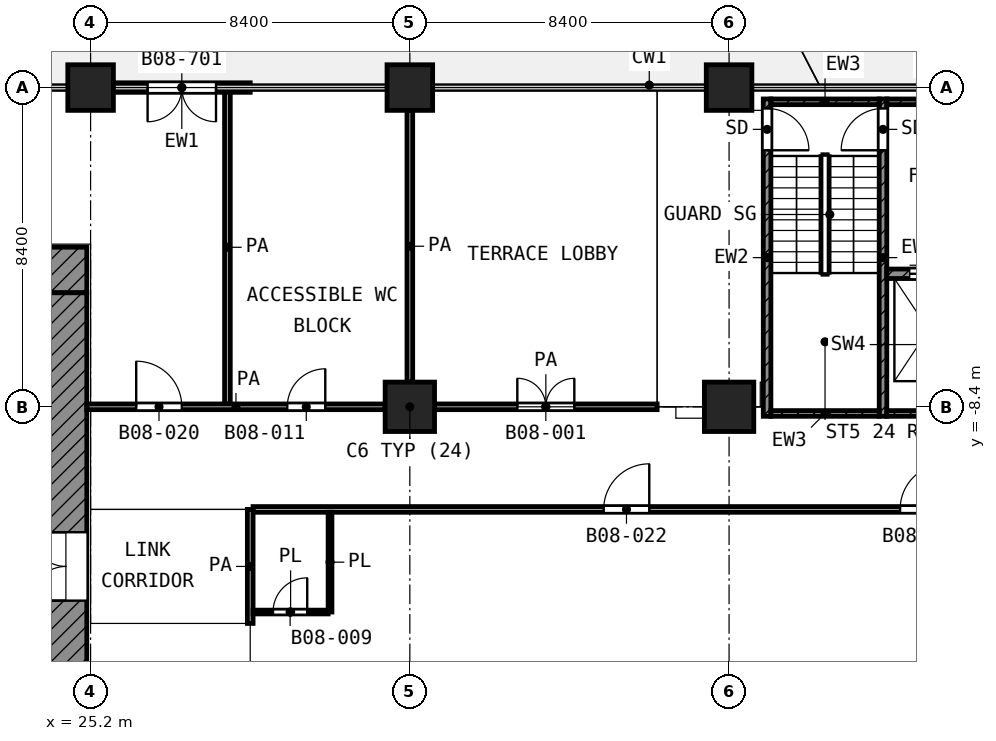
"""IFC4 building model, lengths in metres.
Left out: names, types, materials, properties, quantities, classifications, styles, units other than length and angle.
Written with IfcOpenShell. Run it as: python <this file> out.ifc"""

import sys

from ifc_helpers import new_model, si_unit, direction, frame, frame_2d, origin, origin_2d, place, context, subcontext, project, spatial, rectangle, extrude, element, fill, save


model = new_model("IFC4")
c1 = context("Model", 3, precision=1e-05, world=origin(), true_north=direction((0.0, 1.0)))
c2 = subcontext(c1, "Body", "Model", "MODEL_VIEW")
j1 = project(units=[si_unit("LENGTHUNIT", "METRE"), si_unit("PLANEANGLEUNIT", "RADIAN")], contexts=[c1])
p1 = place(None, origin())
s1 = spatial("IfcSite", under=j1, at=p1, CompositionType="ELEMENT")
p2 = place(p1, origin())
s2 = spatial("IfcBuilding", under=s1, at=p2, CompositionType="ELEMENT")
p3 = place(p2, frame((0.0, 0.0, 39.2)))
s3 = spatial("IfcBuildingStorey", under=s2, at=p3, CompositionType="ELEMENT", Elevation=39.2)
for number, where, z_axis, x_axis in (
    (1, (25.2, 0.0, 0.0), (0.0, 0.0, 1.0), (1.0, 0.0, 0.0)),
    (2, (33.6, 0.0, 0.0), (0.0, 0.0, 1.0), (1.0, 0.0, 0.0)),
    (3, (42.0, 0.0, 0.0), (0.0, 0.0, 1.0), (1.0, 0.0, 0.0)),
):
    element("IfcColumn", number, at=place(p3, frame(where, z_axis=z_axis, x_axis=x_axis)), inside=s3, PredefinedType="COLUMN", context=c2, shape_type="SweptSolid", body=[
        extrude(rectangle(XDim=1.2, YDim=1.2, at=origin_2d()), origin(), (0.0, 0.0, 1.0), 4.2),
    ])
for number, where, z_axis, x_axis in (
    (4, (33.6, -8.4, 0.0), (0.0, 0.0, 1.0), (1.0, 0.0, 0.0)),
    (5, (42.0, -8.4, 0.0), (0.0, 0.0, 1.0), (1.0, 0.0, 0.0)),
):
    element("IfcColumn", number, at=place(p3, frame(where, z_axis=z_axis, x_axis=x_axis)), inside=s3, PredefinedType="COLUMN", context=c2, shape_type="SweptSolid", body=[
        extrude(rectangle(XDim=1.3, YDim=1.3, at=origin_2d()), origin(), (0.0, 0.0, 1.0), 4.2),
    ])
p4 = place(p3, frame((29.4, 0.0, 0.0), z_axis=(0.0, 0.0, 1.0), x_axis=(-1.0, 0.0, 0.0)))
e6 = element("IfcWall", 6, at=p4, inside=s3, PredefinedType="SOLIDWALL", context=c2, shape_type="SweptSolid", body=[
    extrude(rectangle(XDim=3.6, YDim=0.25, at=frame_2d((1.8, 0.0))), origin(), (0.0, 0.0, 1.0), 3.78),
])
p5 = place(p4, frame((0.9, 0.0, 0.0)))
e7 = element("IfcOpeningElement", 7, at=p5, cuts=e6, PredefinedType="OPENING", context=c2, shape_type="SweptSolid", body=[
    extrude(rectangle(XDim=1.8, YDim=2.1, at=frame_2d((0.9, 1.05))), frame((0.0, 0.135, 0.0), z_axis=(0.0, -1.0, 0.0), x_axis=(1.0, 0.0, 0.0)), (0.0, 0.0, 1.0), 0.27),
])
p6 = place(p3, frame((4.2, -4.8, 0.0), z_axis=(0.0, 0.0, 1.0), x_axis=(1.0, 0.0, 0.0)))
e8 = element("IfcWall", 8, at=p6, inside=s3, PredefinedType="SHEAR", context=c2, shape_type="SweptSolid", body=[
    extrude(rectangle(XDim=20.9, YDim=1.2, at=frame_2d((10.45, 0.0))), origin(), (0.0, 0.0, 1.0), 3.9),
])
p7 = place(p6, frame((1.95, 0.0, 0.0)))
e9 = element("IfcOpeningElement", 9, at=p7, cuts=e8, PredefinedType="OPENING", context=c2, shape_type="SweptSolid", body=[
    extrude(rectangle(XDim=1.1, YDim=2.1, at=frame_2d((0.55, 1.05))), frame((0.0, 0.61, 0.0), z_axis=(0.0, -1.0, 0.0), x_axis=(1.0, 0.0, 0.0)), (0.0, 0.0, 1.0), 1.22),
])
p8 = place(p6, frame((17.95, 0.0, 0.0)))
e10 = element("IfcOpeningElement", 10, at=p8, cuts=e8, PredefinedType="OPENING", context=c2, shape_type="SweptSolid", body=[
    extrude(rectangle(XDim=1.1, YDim=2.1, at=frame_2d((0.55, 1.05))), frame((0.0, 0.61, 0.0), z_axis=(0.0, -1.0, 0.0), x_axis=(1.0, 0.0, 0.0)), (0.0, 0.0, 1.0), 1.22),
])
p9 = place(p3, frame((24.55, -24.0, 0.0), z_axis=(0.0, 0.0, 1.0), x_axis=(0.0, 1.0, 0.0)))
e11 = element("IfcWall", 11, at=p9, inside=s3, PredefinedType="SHEAR", context=c2, shape_type="SweptSolid", body=[
    extrude(rectangle(XDim=18.6, YDim=1.1, at=frame_2d((9.3, 0.0))), origin(), (0.0, 0.0, 1.0), 3.9),
])
p10 = place(p9, frame((10.5, 0.0, 0.0)))
e12 = element("IfcOpeningElement", 12, at=p10, cuts=e11, PredefinedType="OPENING", context=c2, shape_type="SweptSolid", body=[
    extrude(rectangle(XDim=1.8, YDim=2.1, at=frame_2d((0.9, 1.05))), frame((0.0, 0.56, 0.0), z_axis=(0.0, -1.0, 0.0), x_axis=(1.0, 0.0, 0.0)), (0.0, 0.0, 1.0), 1.12),
])
p11 = place(p3, frame((43.0, -8.65, 0.0), z_axis=(0.0, 0.0, 1.0), x_axis=(0.0, 1.0, 0.0)))
e13 = element("IfcWall", 13, at=p11, inside=s3, PredefinedType="SHEAR", context=c2, shape_type="SweptSolid", body=[
    extrude(rectangle(XDim=8.35, YDim=0.2, at=frame_2d((4.175, 0.0))), origin(), (0.0, 0.0, 1.0), 3.9),
])
p12 = place(p11, frame((7.0, 0.0, 0.0)))
e14 = element("IfcOpeningElement", 14, at=p12, cuts=e13, PredefinedType="OPENING", context=c2, shape_type="SweptSolid", body=[
    extrude(rectangle(XDim=1.1, YDim=2.1, at=frame_2d((0.55, 1.05))), frame((0.0, 0.11, 0.0), z_axis=(0.0, -1.0, 0.0), x_axis=(1.0, 0.0, 0.0)), (0.0, 0.0, 1.0), 0.22),
])
p13 = place(p3, frame((46.05, -8.65, 0.0), z_axis=(0.0, 0.0, 1.0), x_axis=(0.0, 1.0, 0.0)))
e15 = element("IfcWall", 15, at=p13, inside=s3, PredefinedType="SHEAR", context=c2, shape_type="SweptSolid", body=[
    extrude(rectangle(XDim=8.35, YDim=0.2, at=frame_2d((4.175, 0.0))), origin(), (0.0, 0.0, 1.0), 3.9),
])
p14 = place(p13, frame((7.0, 0.0, 0.0)))
e16 = element("IfcOpeningElement", 16, at=p14, cuts=e15, PredefinedType="OPENING", context=c2, shape_type="SweptSolid", body=[
    extrude(rectangle(XDim=1.1, YDim=2.1, at=frame_2d((0.55, 1.05))), frame((0.0, 0.11, 0.0), z_axis=(0.0, -1.0, 0.0), x_axis=(1.0, 0.0, 0.0)), (0.0, 0.0, 1.0), 0.22),
])
p15 = place(p3, frame((43.1, -0.375, 0.0), z_axis=(0.0, 0.0, 1.0), x_axis=(1.0, 0.0, 0.0)))
e17 = element("IfcWall", 17, at=p15, inside=s3, PredefinedType="SHEAR", context=c2, shape_type="SweptSolid", body=[
    extrude(rectangle(XDim=2.85, YDim=0.15, at=frame_2d((1.425, 0.0))), origin(), (0.0, 0.0, 1.0), 3.9),
])
p16 = place(p3, frame((46.15, -0.375, 0.0), z_axis=(0.0, 0.0, 1.0), x_axis=(1.0, 0.0, 0.0)))
e18 = element("IfcWall", 18, at=p16, inside=s3, PredefinedType="SHEAR", context=c2, shape_type="SweptSolid", body=[
    extrude(rectangle(XDim=2.45, YDim=0.15, at=frame_2d((1.225, 0.0))), origin(), (0.0, 0.0, 1.0), 3.9),
])
p17 = place(p3, frame((43.1, -8.575, 0.0), z_axis=(0.0, 0.0, 1.0), x_axis=(1.0, 0.0, 0.0)))
e19 = element("IfcWall", 19, at=p17, inside=s3, PredefinedType="SHEAR", context=c2, shape_type="SweptSolid", body=[
    extrude(rectangle(XDim=2.85, YDim=0.15, at=frame_2d((1.425, 0.0))), origin(), (0.0, 0.0, 1.0), 3.9),
])
p18 = place(p3, frame((46.15, -8.575, 0.0), z_axis=(0.0, 0.0, 1.0), x_axis=(1.0, 0.0, 0.0)))
e20 = element("IfcWall", 20, at=p18, inside=s3, PredefinedType="SHEAR", context=c2, shape_type="SweptSolid", body=[
    extrude(rectangle(XDim=2.45, YDim=0.15, at=frame_2d((1.225, 0.0))), origin(), (0.0, 0.0, 1.0), 3.9),
])
p19 = place(p3, frame((46.15, -4.9, 0.0), z_axis=(0.0, 0.0, 1.0), x_axis=(1.0, 0.0, 0.0)))
e21 = element("IfcWall", 21, at=p19, inside=s3, PredefinedType="SHEAR", context=c2, shape_type="SweptSolid", body=[
    extrude(rectangle(XDim=2.45, YDim=0.25, at=frame_2d((1.225, 0.0))), origin(), (0.0, 0.0, 1.0), 3.9),
])
p20 = place(p19, frame((0.6, 0.0, 0.0)))
e22 = element("IfcOpeningElement", 22, at=p20, cuts=e21, PredefinedType="OPENING", context=c2, shape_type="SweptSolid", body=[
    extrude(rectangle(XDim=1.3, YDim=2.1, at=frame_2d((0.65, 1.05))), frame((0.0, 0.135, 0.0), z_axis=(0.0, -1.0, 0.0), x_axis=(1.0, 0.0, 0.0)), (0.0, 0.0, 1.0), 0.27),
])
p21 = place(p3, frame((29.475, -13.8, 0.0), z_axis=(0.0, 0.0, 1.0), x_axis=(1.0, 0.0, 0.0)))
e23 = element("IfcWall", 23, at=p21, inside=s3, PredefinedType="PARTITIONING", context=c2, shape_type="SweptSolid", body=[
    extrude(rectangle(XDim=1.975, YDim=0.1, at=frame_2d((0.987, 0.0))), origin(), (0.0, 0.0, 1.0), 3.9),
])
p22 = place(p21, frame((0.525, 0.0, 0.0)))
e24 = element("IfcOpeningElement", 24, at=p22, cuts=e23, PredefinedType="OPENING", context=c2, shape_type="SweptSolid", body=[
    extrude(rectangle(XDim=0.9, YDim=2.1, at=frame_2d((0.45, 1.05))), frame((0.0, 0.06, 0.0), z_axis=(0.0, -1.0, 0.0), x_axis=(1.0, 0.0, 0.0)), (0.0, 0.0, 1.0), 0.12),
])
p23 = place(p3, frame((31.5, -13.8, 0.0), z_axis=(0.0, 0.0, 1.0), x_axis=(0.0, 1.0, 0.0)))
e25 = element("IfcWall", 25, at=p23, inside=s3, PredefinedType="PARTITIONING", context=c2, shape_type="SweptSolid", body=[
    extrude(rectangle(XDim=2.625, YDim=0.1, at=frame_2d((1.312, 0.0))), origin(), (0.0, 0.0, 1.0), 3.9),
])
p24 = place(p3, frame((29.475, -11.1, 0.0), z_axis=(0.0, 0.0, 1.0), x_axis=(1.0, 0.0, 0.0)))
e26 = element("IfcWall", 26, at=p24, inside=s3, PredefinedType="PARTITIONING", context=c2, shape_type="SweptSolid", body=[
    extrude(rectangle(XDim=50.245, YDim=0.15, at=frame_2d((25.123, 0.0))), origin(), (0.0, 0.0, 1.0), 3.9),
])
p25 = place(p24, frame((17.025, 0.0, 0.0)))
e27 = element("IfcOpeningElement", 27, at=p25, cuts=e26, PredefinedType="OPENING", context=c2, shape_type="SweptSolid", body=[
    extrude(rectangle(XDim=1.2, YDim=2.1, at=frame_2d((0.6, 1.05))), frame((0.0, 0.085, 0.0), z_axis=(0.0, -1.0, 0.0), x_axis=(1.0, 0.0, 0.0)), (0.0, 0.0, 1.0), 0.17),
])
p26 = place(p24, frame((9.225, 0.0, 0.0)))
e28 = element("IfcOpeningElement", 28, at=p26, cuts=e26, PredefinedType="OPENING", context=c2, shape_type="SweptSolid", body=[
    extrude(rectangle(XDim=1.2, YDim=2.1, at=frame_2d((0.6, 1.05))), frame((0.0, 0.085, 0.0), z_axis=(0.0, -1.0, 0.0), x_axis=(1.0, 0.0, 0.0)), (0.0, 0.0, 1.0), 0.17),
])
p27 = place(p24, frame((28.425, 0.0, 0.0)))
e29 = element("IfcOpeningElement", 29, at=p27, cuts=e26, PredefinedType="OPENING", context=c2, shape_type="SweptSolid", body=[
    extrude(rectangle(XDim=1.5, YDim=2.1, at=frame_2d((0.75, 1.05))), frame((0.0, 0.085, 0.0), z_axis=(0.0, -1.0, 0.0), x_axis=(1.0, 0.0, 0.0)), (0.0, 0.0, 1.0), 0.17),
])
p28 = place(p24, frame((36.675, 0.0, 0.0)))
e30 = element("IfcOpeningElement", 30, at=p28, cuts=e26, PredefinedType="OPENING", context=c2, shape_type="SweptSolid", body=[
    extrude(rectangle(XDim=1.5, YDim=2.1, at=frame_2d((0.75, 1.05))), frame((0.0, 0.085, 0.0), z_axis=(0.0, -1.0, 0.0), x_axis=(1.0, 0.0, 0.0)), (0.0, 0.0, 1.0), 0.17),
])
p29 = place(p24, frame((45.375, 0.0, 0.0)))
e31 = element("IfcOpeningElement", 31, at=p29, cuts=e26, PredefinedType="OPENING", context=c2, shape_type="SweptSolid", body=[
    extrude(rectangle(XDim=1.5, YDim=2.1, at=frame_2d((0.75, 1.05))), frame((0.0, 0.085, 0.0), z_axis=(0.0, -1.0, 0.0), x_axis=(1.0, 0.0, 0.0)), (0.0, 0.0, 1.0), 0.17),
])
p30 = place(p3, frame((25.1, -8.4, 0.0), z_axis=(0.0, 0.0, 1.0), x_axis=(1.0, 0.0, 0.0)))
e32 = element("IfcWall", 32, at=p30, inside=s3, PredefinedType="PARTITIONING", context=c2, shape_type="SweptSolid", body=[
    extrude(rectangle(XDim=7.85, YDim=0.15, at=frame_2d((3.925, 0.0))), origin(), (0.0, 0.0, 1.0), 3.9),
])
p31 = place(p30, frame((1.3, 0.0, 0.0)))
e33 = element("IfcOpeningElement", 33, at=p31, cuts=e32, PredefinedType="OPENING", context=c2, shape_type="SweptSolid", body=[
    extrude(rectangle(XDim=1.2, YDim=2.1, at=frame_2d((0.6, 1.05))), frame((0.0, 0.085, 0.0), z_axis=(0.0, -1.0, 0.0), x_axis=(1.0, 0.0, 0.0)), (0.0, 0.0, 1.0), 0.17),
])
p32 = place(p30, frame((5.275, 0.0, 0.0)))
e34 = element("IfcOpeningElement", 34, at=p32, cuts=e32, PredefinedType="OPENING", context=c2, shape_type="SweptSolid", body=[
    extrude(rectangle(XDim=1.0, YDim=2.1, at=frame_2d((0.5, 1.05))), frame((0.0, 0.085, 0.0), z_axis=(0.0, -1.0, 0.0), x_axis=(1.0, 0.0, 0.0)), (0.0, 0.0, 1.0), 0.17),
])
p33 = place(p3, frame((34.25, -8.4, 0.0), z_axis=(0.0, 0.0, 1.0), x_axis=(1.0, 0.0, 0.0)))
e35 = element("IfcWall", 35, at=p33, inside=s3, PredefinedType="PARTITIONING", context=c2, shape_type="SweptSolid", body=[
    extrude(rectangle(XDim=5.857, YDim=0.15, at=frame_2d((2.928, 0.0))), origin(), (0.0, 0.0, 1.0), 3.9),
])
p34 = place(p33, frame((2.178, 0.0, 0.0)))
e36 = element("IfcOpeningElement", 36, at=p34, cuts=e35, PredefinedType="OPENING", context=c2, shape_type="SweptSolid", body=[
    extrude(rectangle(XDim=1.5, YDim=2.1, at=frame_2d((0.75, 1.05))), frame((0.0, 0.085, 0.0), z_axis=(0.0, -1.0, 0.0), x_axis=(1.0, 0.0, 0.0)), (0.0, 0.0, 1.0), 0.17),
])
p35 = place(p3, frame((28.8, -8.325, 0.0), z_axis=(0.0, 0.0, 1.0), x_axis=(0.0, 1.0, 0.0)))
e37 = element("IfcWall", 37, at=p35, inside=s3, PredefinedType="PARTITIONING", context=c2, shape_type="SweptSolid", body=[
    extrude(rectangle(XDim=8.245, YDim=0.15, at=frame_2d((4.123, 0.0))), origin(), (0.0, 0.0, 1.0), 3.9),
])
p36 = place(p3, frame((29.4, -14.1, 0.0), z_axis=(0.0, 0.0, 1.0), x_axis=(0.0, 1.0, 0.0)))
e38 = element("IfcWall", 38, at=p36, inside=s3, PredefinedType="PARTITIONING", context=c2, shape_type="SweptSolid", body=[
    extrude(rectangle(XDim=3.0, YDim=0.15, at=frame_2d((1.5, 0.0))), origin(), (0.0, 0.0, 1.0), 3.9),
])
p37 = place(p3, frame((33.6, -7.75, 0.0), z_axis=(0.0, 0.0, 1.0), x_axis=(0.0, 1.0, 0.0)))
e39 = element("IfcWall", 39, at=p37, inside=s3, PredefinedType="PARTITIONING", context=c2, shape_type="SweptSolid", body=[
    extrude(rectangle(XDim=7.15, YDim=0.15, at=frame_2d((3.575, 0.0))), origin(), (0.0, 0.0, 1.0), 3.9),
])
p38 = place(p5, origin())
e40 = element("IfcDoor", 40, at=p38, inside=s3, OperationType="DOUBLE_DOOR_SINGLE_SWING", PredefinedType="DOOR", context=c2, shape_type="SweptSolid", body=[
    extrude(rectangle(XDim=1.8, YDim=2.1, at=frame_2d((0.9, 1.05))), frame((0.0, 0.025, 0.0), z_axis=(0.0, -1.0, 0.0), x_axis=(1.0, 0.0, 0.0)), (0.0, 0.0, 1.0), 0.05),
])
fill(e7, e40)
p39 = place(p10, origin())
e41 = element("IfcDoor", 41, at=p39, inside=s3, OperationType="DOUBLE_DOOR_SINGLE_SWING", PredefinedType="DOOR", context=c2, shape_type="SweptSolid", body=[
    extrude(rectangle(XDim=1.8, YDim=2.1, at=frame_2d((0.9, 1.05))), frame((0.0, 0.025, 0.0), z_axis=(0.0, -1.0, 0.0), x_axis=(1.0, 0.0, 0.0)), (0.0, 0.0, 1.0), 0.05),
])
fill(e12, e41)
p40 = place(p12, frame((1.1, 0.0, 0.0), z_axis=(0.0, 0.0, 1.0), x_axis=(-1.0, 0.0, 0.0)))
e42 = element("IfcDoor", 42, at=p40, inside=s3, OperationType="SINGLE_SWING_LEFT", PredefinedType="DOOR", context=c2, shape_type="SweptSolid", body=[
    extrude(rectangle(XDim=1.1, YDim=2.1, at=frame_2d((0.55, 1.05))), frame((0.0, 0.025, 0.0), z_axis=(0.0, -1.0, 0.0), x_axis=(1.0, 0.0, 0.0)), (0.0, 0.0, 1.0), 0.05),
])
fill(e14, e42)
p41 = place(p14, origin())
e43 = element("IfcDoor", 43, at=p41, inside=s3, OperationType="SINGLE_SWING_LEFT", PredefinedType="DOOR", context=c2, shape_type="SweptSolid", body=[
    extrude(rectangle(XDim=1.1, YDim=2.1, at=frame_2d((0.55, 1.05))), frame((0.0, 0.025, 0.0), z_axis=(0.0, -1.0, 0.0), x_axis=(1.0, 0.0, 0.0)), (0.0, 0.0, 1.0), 0.05),
])
fill(e16, e43)
p42 = place(p20, origin())
e44 = element("IfcDoor", 44, at=p42, inside=s3, OperationType="DOUBLE_DOOR_SLIDING", PredefinedType="DOOR", context=c2, shape_type="SweptSolid", body=[
    extrude(rectangle(XDim=1.3, YDim=2.1, at=frame_2d((0.65, 1.05))), frame((0.0, 0.025, 0.0), z_axis=(0.0, -1.0, 0.0), x_axis=(1.0, 0.0, 0.0)), (0.0, 0.0, 1.0), 0.05),
])
fill(e22, e44)
p43 = place(p31, origin())
e45 = element("IfcDoor", 45, at=p43, inside=s3, OperationType="SINGLE_SWING_LEFT", PredefinedType="DOOR", context=c2, shape_type="SweptSolid", body=[
    extrude(rectangle(XDim=1.2, YDim=2.1, at=frame_2d((0.6, 1.05))), frame((0.0, 0.025, 0.0), z_axis=(0.0, -1.0, 0.0), x_axis=(1.0, 0.0, 0.0)), (0.0, 0.0, 1.0), 0.05),
])
fill(e33, e45)
p44 = place(p32, origin())
e46 = element("IfcDoor", 46, at=p44, inside=s3, OperationType="SINGLE_SWING_RIGHT", PredefinedType="DOOR", context=c2, shape_type="SweptSolid", body=[
    extrude(rectangle(XDim=1.0, YDim=2.1, at=frame_2d((0.5, 1.05))), frame((0.0, 0.025, 0.0), z_axis=(0.0, -1.0, 0.0), x_axis=(1.0, 0.0, 0.0)), (0.0, 0.0, 1.0), 0.05),
])
fill(e34, e46)
p45 = place(p34, origin())
e47 = element("IfcDoor", 47, at=p45, inside=s3, OperationType="DOUBLE_DOOR_SINGLE_SWING", PredefinedType="DOOR", context=c2, shape_type="SweptSolid", body=[
    extrude(rectangle(XDim=1.5, YDim=2.1, at=frame_2d((0.75, 1.05))), frame((0.0, 0.025, 0.0), z_axis=(0.0, -1.0, 0.0), x_axis=(1.0, 0.0, 0.0)), (0.0, 0.0, 1.0), 0.05),
])
fill(e36, e47)
p46 = place(p25, origin())
e48 = element("IfcDoor", 48, at=p46, inside=s3, OperationType="SINGLE_SWING_RIGHT", PredefinedType="DOOR", context=c2, shape_type="SweptSolid", body=[
    extrude(rectangle(XDim=1.2, YDim=2.1, at=frame_2d((0.6, 1.05))), frame((0.0, 0.025, 0.0), z_axis=(0.0, -1.0, 0.0), x_axis=(1.0, 0.0, 0.0)), (0.0, 0.0, 1.0), 0.05),
])
fill(e27, e48)
p47 = place(p26, origin())
e49 = element("IfcDoor", 49, at=p47, inside=s3, OperationType="SINGLE_SWING_RIGHT", PredefinedType="DOOR", context=c2, shape_type="SweptSolid", body=[
    extrude(rectangle(XDim=1.2, YDim=2.1, at=frame_2d((0.6, 1.05))), frame((0.0, 0.025, 0.0), z_axis=(0.0, -1.0, 0.0), x_axis=(1.0, 0.0, 0.0)), (0.0, 0.0, 1.0), 0.05),
])
fill(e28, e49)
p48 = place(p22, origin())
e50 = element("IfcDoor", 50, at=p48, inside=s3, OperationType="SINGLE_SWING_RIGHT", PredefinedType="DOOR", context=c2, shape_type="SweptSolid", body=[
    extrude(rectangle(XDim=0.9, YDim=2.1, at=frame_2d((0.45, 1.05))), frame((0.0, 0.025, 0.0), z_axis=(0.0, -1.0, 0.0), x_axis=(1.0, 0.0, 0.0)), (0.0, 0.0, 1.0), 0.05),
])
fill(e24, e50)
save(model, sys.argv[1])
